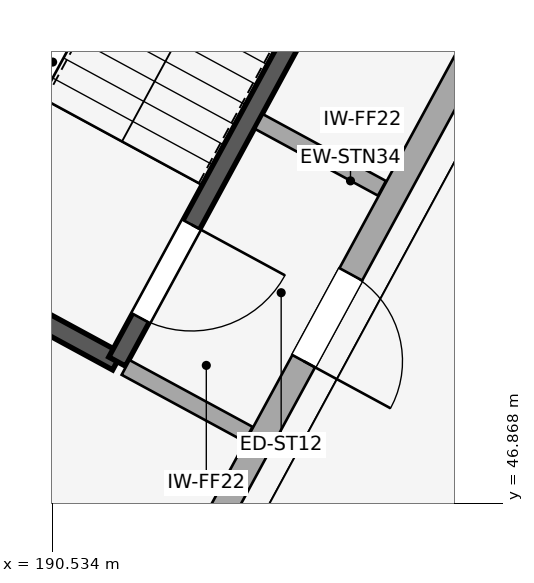
"""IFC4 building model, lengths in metres.
Left out: names, types, materials, properties, quantities, classifications, styles, units other than length and angle.
Written with IfcOpenShell. Run it as: python <this file> out.ifc"""

import sys

from ifc_helpers import new_model, si_unit, direction, frame, frame_2d, origin, place, context, subcontext, project, spatial, rectangle, extrude, element, fill, save


model = new_model("IFC4")
c1 = context("Model", 3, precision=1e-05, world=origin(), true_north=direction((0.0, 1.0)))
c2 = subcontext(c1, "Body", "Model", "MODEL_VIEW")
j1 = project(units=[si_unit("LENGTHUNIT", "METRE"), si_unit("PLANEANGLEUNIT", "RADIAN")], contexts=[c1])
p1 = place(None, origin())
s1 = spatial("IfcSite", under=j1, at=p1, CompositionType="ELEMENT")
p2 = place(p1, origin())
s2 = spatial("IfcBuilding", under=s1, at=p2, CompositionType="ELEMENT")
p3 = place(p2, origin())
s3 = spatial("IfcBuildingStorey", under=s2, at=p3, CompositionType="ELEMENT", Elevation=0.0)
p4 = place(p3, frame((191.76, 44.904, 0.0), z_axis=(0.0, 0.0, 1.0), x_axis=(0.47689360532, 0.878961028263, 0.0)))
e1 = element("IfcWall", 1, at=p4, inside=s3, PredefinedType="STANDARD", context=c2, shape_type="SweptSolid", body=[
    extrude(rectangle(XDim=18.562, YDim=0.34, at=frame_2d((9.281, 0.0))), origin(), (0.0, 0.0, 1.0), 3.85),
])
p5 = place(p4, frame((4.36, 0.0, 0.0)))
e2 = element("IfcOpeningElement", 2, at=p5, cuts=e1, PredefinedType="OPENING", context=c2, shape_type="SweptSolid", body=[
    extrude(rectangle(XDim=1.3, YDim=2.2, at=frame_2d((0.65, 1.1))), frame((0.0, 0.18, 0.0), z_axis=(0.0, -1.0, 0.0), x_axis=(1.0, 0.0, 0.0)), (0.0, 0.0, 1.0), 0.36),
])
p6 = place(p4, frame((11.081, 0.0, 0.0)))
e3 = element("IfcOpeningElement", 3, at=p6, cuts=e1, PredefinedType="OPENING", context=c2, shape_type="SweptSolid", body=[
    extrude(rectangle(XDim=2.35, YDim=2.4, at=frame_2d((1.175, 1.2))), frame((0.0, 0.18, 0.0), z_axis=(0.0, -1.0, 0.0), x_axis=(1.0, 0.0, 0.0)), (0.0, 0.0, 1.0), 0.36),
])
p7 = place(p3, frame((186.77, 51.235, 0.0), z_axis=(0.0, 0.0, 1.0), x_axis=(0.878941993928, -0.476928685769, 0.0)))
e4 = element("IfcWall", 4, at=p7, inside=s3, PredefinedType="SHEAR", context=c2, shape_type="SweptSolid", body=[
    extrude(rectangle(XDim=5.25, YDim=0.25, at=frame_2d((2.625, 0.0))), origin(), (0.0, 0.0, 1.0), 5.1),
])
p8 = place(p3, frame((191.385, 48.731, 0.0), z_axis=(0.0, 0.0, 1.0), x_axis=(0.476876856974, 0.878970115125, 0.0)))
e5 = element("IfcWall", 5, at=p8, inside=s3, PredefinedType="SHEAR", context=c2, shape_type="SweptSolid", body=[
    extrude(rectangle(XDim=10.45, YDim=0.25, at=frame_2d((5.225, 0.0))), origin(), (0.0, 0.0, 1.0), 5.1),
])
p9 = place(p8, frame((0.65, 0.0, 0.0)))
e6 = element("IfcOpeningElement", 6, at=p9, cuts=e5, PredefinedType="OPENING", context=c2, shape_type="SweptSolid", body=[
    extrude(rectangle(XDim=1.4, YDim=2.2, at=frame_2d((0.7, 1.1))), frame((0.0, 0.135, 0.0), z_axis=(0.0, -1.0, 0.0), x_axis=(1.0, 0.0, 0.0)), (0.0, 0.0, 1.0), 0.27),
])
p10 = place(p3, frame((191.754, 60.42, 0.0), z_axis=(0.0, 0.0, 1.0), x_axis=(-0.476886649814, -0.878964802042, 0.0)))
e7 = element("IfcWall", 7, at=p10, inside=s3, PredefinedType="SHEAR", context=c2, shape_type="SweptSolid", body=[
    extrude(rectangle(XDim=10.45, YDim=0.25, at=frame_2d((5.225, 0.0))), origin(), (0.0, 0.0, 1.0), 5.1),
])
p11 = place(p3, frame((191.496, 48.654, 0.0), z_axis=(0.0, 0.0, 1.0), x_axis=(0.878928142612, -0.476954211769, 0.0)))
e8 = element("IfcWall", 8, at=p11, inside=s3, PredefinedType="PARTITIONING", context=c2, shape_type="SweptSolid", body=[
    extrude(rectangle(XDim=1.84, YDim=0.22, at=frame_2d((0.92, 0.0))), origin(), (0.0, 0.0, 1.0), 3.69),
])
p12 = place(p3, frame((193.251, 51.888, 0.0), z_axis=(0.0, 0.0, 1.0), x_axis=(0.878958326558, -0.47689858479, 0.0)))
e9 = element("IfcWall", 9, at=p12, inside=s3, PredefinedType="PARTITIONING", context=c2, shape_type="SweptSolid", body=[
    extrude(rectangle(XDim=1.84, YDim=0.22, at=frame_2d((0.92, 0.0))), origin(), (0.0, 0.0, 1.0), 3.69),
])
p13 = place(p5, frame((1.3, 0.0, 0.0), z_axis=(0.0, 0.0, 1.0), x_axis=(-1.0, 0.0, 0.0)))
e10 = element("IfcDoor", 10, at=p13, inside=s3, OperationType="SINGLE_SWING_RIGHT", PredefinedType="DOOR", context=c2, shape_type="SweptSolid", body=[
    extrude(rectangle(XDim=1.3, YDim=2.2, at=frame_2d((0.65, 1.1))), frame((0.0, 0.025, 0.0), z_axis=(0.0, -1.0, 0.0), x_axis=(1.0, 0.0, 0.0)), (0.0, 0.0, 1.0), 0.05),
])
fill(e2, e10)
p14 = place(p9, frame((1.4, 0.0, 0.0), z_axis=(0.0, 0.0, 1.0), x_axis=(-1.0, 0.0, 0.0)))
e11 = element("IfcDoor", 11, at=p14, inside=s3, OperationType="SINGLE_SWING_LEFT", PredefinedType="DOOR", context=c2, shape_type="SweptSolid", body=[
    extrude(rectangle(XDim=1.4, YDim=2.2, at=frame_2d((0.7, 1.1))), frame((0.0, 0.025, 0.0), z_axis=(0.0, -1.0, 0.0), x_axis=(1.0, 0.0, 0.0)), (0.0, 0.0, 1.0), 0.05),
])
fill(e6, e11)
save(model, sys.argv[1])
